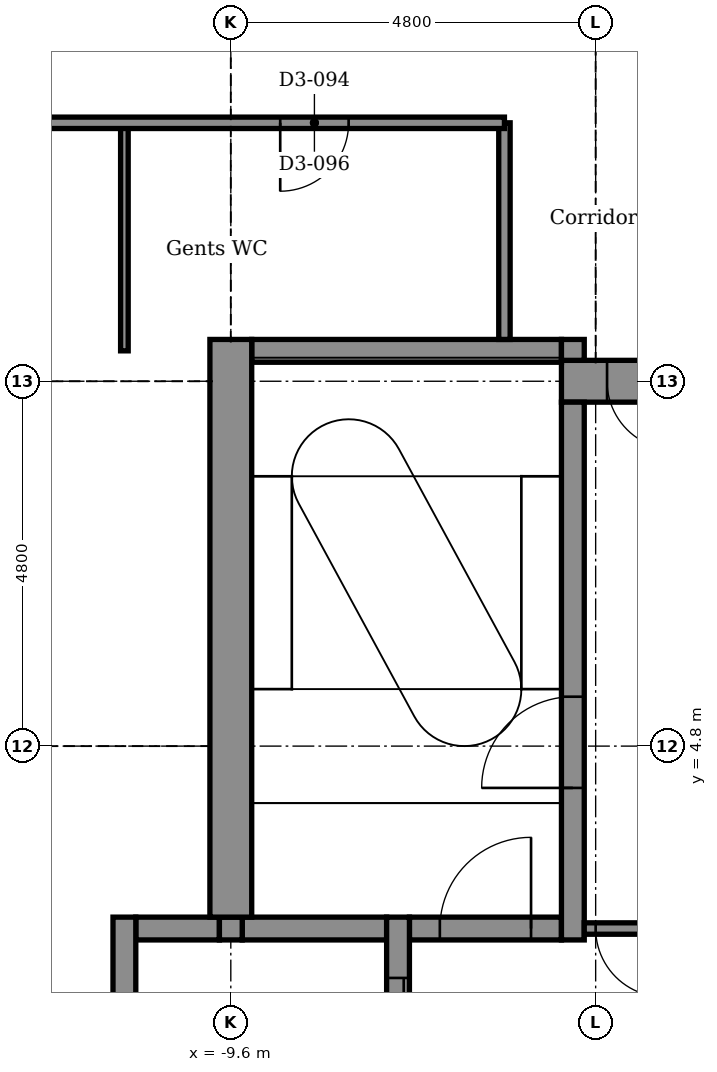
"""IFC4 building model, lengths in metres.
Left out: names, types, materials, properties, quantities, classifications, styles, units other than length and angle.
Written with IfcOpenShell. Run it as: python <this file> out.ifc"""

import sys

from ifc_helpers import new_model, si_unit, direction, frame, frame_2d, origin, place, context, subcontext, project, spatial, rectangle, extrude, element, fill, save


model = new_model("IFC4")
c1 = context("Model", 3, precision=1e-05, world=origin(), true_north=direction((0.0, 1.0)))
c2 = subcontext(c1, "Body", "Model", "MODEL_VIEW")
j1 = project(units=[si_unit("LENGTHUNIT", "METRE"), si_unit("PLANEANGLEUNIT", "RADIAN")], contexts=[c1])
p1 = place(None, origin())
s1 = spatial("IfcSite", under=j1, at=p1, CompositionType="ELEMENT")
p2 = place(p1, origin())
s2 = spatial("IfcBuilding", under=s1, at=p2, CompositionType="ELEMENT")
p3 = place(p2, frame((0.0, 0.0, 289.1)))
s3 = spatial("IfcBuildingStorey", under=s2, at=p3, CompositionType="ELEMENT", Elevation=289.1)
p4 = place(p3, frame((-10.85, 2.4, -0.15), z_axis=(0.0, 0.0, 1.0), x_axis=(1.0, 0.0, 0.0)))
e1 = element("IfcWall", 1, at=p4, inside=s3, PredefinedType="STANDARD", context=c2, shape_type="SweptSolid", body=[
    extrude(rectangle(XDim=1.1, YDim=0.3, at=frame_2d((0.55, 0.0))), origin(), (0.0, 0.0, 1.0), 3.9),
])
p5 = place(p3, frame((-9.45, 2.4, -0.15), z_axis=(0.0, 0.0, 1.0), x_axis=(1.0, 0.0, 0.0)))
e2 = element("IfcWall", 2, at=p5, inside=s3, PredefinedType="STANDARD", context=c2, shape_type="SweptSolid", body=[
    extrude(rectangle(XDim=1.9, YDim=0.3, at=frame_2d((0.95, 0.0))), origin(), (0.0, 0.0, 1.0), 3.9),
])
p6 = place(p3, frame((-7.25, 2.4, -0.15), z_axis=(0.0, 0.0, 1.0), x_axis=(1.0, 0.0, 0.0)))
e3 = element("IfcWall", 3, at=p6, inside=s3, PredefinedType="STANDARD", context=c2, shape_type="SweptSolid", body=[
    extrude(rectangle(XDim=2.0, YDim=0.3, at=frame_2d((1.0, 0.0))), origin(), (0.0, 0.0, 1.0), 3.9),
])
p7 = place(p6, frame((0.4, 0.0, 0.15)))
e4 = element("IfcOpeningElement", 4, at=p7, cuts=e3, PredefinedType="OPENING", context=c2, shape_type="SweptSolid", body=[
    extrude(rectangle(XDim=1.2, YDim=2.1, at=frame_2d((0.6, 1.05))), frame((0.0, 0.16, 0.0), z_axis=(0.0, -1.0, 0.0), x_axis=(1.0, 0.0, 0.0)), (0.0, 0.0, 1.0), 0.32),
])
p8 = place(p3, frame((-5.25, 9.6, -0.15), z_axis=(0.0, 0.0, 1.0), x_axis=(1.0, 0.0, 0.0)))
e5 = element("IfcWall", 5, at=p8, inside=s3, PredefinedType="SHEAR", context=c2, shape_type="SweptSolid", body=[
    extrude(rectangle(XDim=14.575, YDim=0.55, at=frame_2d((7.288, 0.0))), origin(), (0.0, 0.0, 1.0), 3.9),
])
p9 = place(p8, frame((0.6, 0.0, 0.15)))
e6 = element("IfcOpeningElement", 6, at=p9, cuts=e5, PredefinedType="OPENING", context=c2, shape_type="SweptSolid", body=[
    extrude(rectangle(XDim=0.9, YDim=2.1, at=frame_2d((0.45, 1.05))), frame((0.0, 0.285, 0.0), z_axis=(0.0, -1.0, 0.0), x_axis=(1.0, 0.0, 0.0)), (0.0, 0.0, 1.0), 0.57),
])
p10 = place(p3, frame((-9.325, 10.0, -0.15), z_axis=(0.0, 0.0, 1.0), x_axis=(1.0, 0.0, 0.0)))
e7 = element("IfcWall", 7, at=p10, inside=s3, PredefinedType="STANDARD", context=c2, shape_type="SweptSolid", body=[
    extrude(rectangle(XDim=4.075, YDim=0.3, at=frame_2d((2.038, 0.0))), origin(), (0.0, 0.0, 1.0), 3.9),
])
p11 = place(p3, frame((-11.0, -2.55, -0.15), z_axis=(0.0, 0.0, 1.0), x_axis=(0.0, 1.0, 0.0)))
e8 = element("IfcWall", 8, at=p11, inside=s3, PredefinedType="STANDARD", context=c2, shape_type="SweptSolid", body=[
    extrude(rectangle(XDim=5.1, YDim=0.3, at=frame_2d((2.55, 0.0))), origin(), (0.0, 0.0, 1.0), 3.9),
])
p12 = place(p3, frame((-9.6, 2.25, -0.15), z_axis=(0.0, 0.0, 1.0), x_axis=(0.0, 1.0, 0.0)))
e9 = element("IfcWall", 9, at=p12, inside=s3, PredefinedType="STANDARD", context=c2, shape_type="SweptSolid", body=[
    extrude(rectangle(XDim=0.3, YDim=0.3, at=frame_2d((0.15, 0.0))), origin(), (0.0, 0.0, 1.0), 3.9),
])
p13 = place(p3, frame((-9.6, 2.55, -0.15), z_axis=(0.0, 0.0, 1.0), x_axis=(0.0, 1.0, 0.0)))
e10 = element("IfcWall", 10, at=p13, inside=s3, PredefinedType="SHEAR", context=c2, shape_type="SweptSolid", body=[
    extrude(rectangle(XDim=7.6, YDim=0.55, at=frame_2d((3.8, 0.0))), origin(), (0.0, 0.0, 1.0), 3.9),
])
p14 = place(p3, frame((-7.4, -2.55, -0.15), z_axis=(0.0, 0.0, 1.0), x_axis=(0.0, 1.0, 0.0)))
e11 = element("IfcWall", 11, at=p14, inside=s3, PredefinedType="STANDARD", context=c2, shape_type="SweptSolid", body=[
    extrude(rectangle(XDim=5.1, YDim=0.3, at=frame_2d((2.55, 0.0))), origin(), (0.0, 0.0, 1.0), 3.9),
])
p15 = place(p14, frame((0.8, 0.0, 0.15)))
e12 = element("IfcOpeningElement", 12, at=p15, cuts=e11, PredefinedType="OPENING", context=c2, shape_type="SweptSolid", body=[
    extrude(rectangle(XDim=1.1, YDim=2.1, at=frame_2d((0.55, 1.05))), frame((0.0, 0.16, 0.0), z_axis=(0.0, -1.0, 0.0), x_axis=(1.0, 0.0, 0.0)), (0.0, 0.0, 1.0), 0.32),
])
p16 = place(p14, frame((3.2, 0.0, 0.15)))
e13 = element("IfcOpeningElement", 13, at=p16, cuts=e11, PredefinedType="OPENING", context=c2, shape_type="SweptSolid", body=[
    extrude(rectangle(XDim=1.1, YDim=2.1, at=frame_2d((0.55, 1.05))), frame((0.0, 0.16, 0.0), z_axis=(0.0, -1.0, 0.0), x_axis=(1.0, 0.0, 0.0)), (0.0, 0.0, 1.0), 0.32),
])
p17 = place(p3, frame((-5.1, 2.25, -0.15), z_axis=(0.0, 0.0, 1.0), x_axis=(0.0, 1.0, 0.0)))
e14 = element("IfcWall", 14, at=p17, inside=s3, PredefinedType="STANDARD", context=c2, shape_type="SweptSolid", body=[
    extrude(rectangle(XDim=7.075, YDim=0.3, at=frame_2d((3.538, 0.0))), origin(), (0.0, 0.0, 1.0), 3.9),
])
p18 = place(p17, frame((2.0, 0.0, 0.15)))
e15 = element("IfcOpeningElement", 15, at=p18, cuts=e14, PredefinedType="OPENING", context=c2, shape_type="SweptSolid", body=[
    extrude(rectangle(XDim=1.2, YDim=2.1, at=frame_2d((0.6, 1.05))), frame((0.0, 0.16, 0.0), z_axis=(0.0, -1.0, 0.0), x_axis=(1.0, 0.0, 0.0)), (0.0, 0.0, 1.0), 0.32),
])
p19 = place(p3, frame((-5.1, 9.875, -0.15), z_axis=(0.0, 0.0, 1.0), x_axis=(0.0, 1.0, 0.0)))
e16 = element("IfcWall", 16, at=p19, inside=s3, PredefinedType="STANDARD", context=c2, shape_type="SweptSolid", body=[
    extrude(rectangle(XDim=0.275, YDim=0.3, at=frame_2d((0.137, 0.0))), origin(), (0.0, 0.0, 1.0), 3.9),
])
p20 = place(p3, frame((-6.0, 10.15, 0.0), z_axis=(0.0, 0.0, 1.0), x_axis=(0.0, 1.0, 0.0)))
e17 = element("IfcWall", 17, at=p20, inside=s3, PredefinedType="PARTITIONING", context=c2, shape_type="SweptSolid", body=[
    extrude(rectangle(XDim=2.85, YDim=0.15, at=frame_2d((1.425, 0.0))), origin(), (0.0, 0.0, 1.0), 3.75),
])
p21 = place(p3, frame((-11.0, 10.0, 0.0), z_axis=(0.0, 0.0, 1.0), x_axis=(0.0, 1.0, 0.0)))
e18 = element("IfcWall", 18, at=p21, inside=s3, PredefinedType="PARTITIONING", context=c2, shape_type="SweptSolid", body=[
    extrude(rectangle(XDim=3.0, YDim=0.1, at=frame_2d((1.5, 0.0))), origin(), (0.0, 0.0, 1.0), 3.75),
])
p22 = place(p3, frame((-14.624, 13.0, 0.0), z_axis=(0.0, 0.0, 1.0), x_axis=(1.0, 0.0, 0.0)))
e19 = element("IfcWall", 19, at=p22, inside=s3, PredefinedType="PARTITIONING", context=c2, shape_type="SweptSolid", body=[
    extrude(rectangle(XDim=8.624, YDim=0.15, at=frame_2d((4.312, 0.0))), origin(), (0.0, 0.0, 1.0), 3.75),
])
p23 = place(p22, frame((5.674, 0.0, 0.0)))
e20 = element("IfcOpeningElement", 20, at=p23, cuts=e19, PredefinedType="OPENING", context=c2, shape_type="SweptSolid", body=[
    extrude(rectangle(XDim=0.9, YDim=2.1, at=frame_2d((0.45, 1.05))), frame((0.0, 0.085, 0.0), z_axis=(0.0, -1.0, 0.0), x_axis=(1.0, 0.0, 0.0)), (0.0, 0.0, 1.0), 0.17),
])
p24 = place(p22, frame((0.502, 0.0, 0.0)))
e21 = element("IfcOpeningElement", 21, at=p24, cuts=e19, PredefinedType="OPENING", context=c2, shape_type="SweptSolid", body=[
    extrude(rectangle(XDim=1.8, YDim=2.1, at=frame_2d((0.9, 1.05))), frame((0.0, 0.085, 0.0), z_axis=(0.0, -1.0, 0.0), x_axis=(1.0, 0.0, 0.0)), (0.0, 0.0, 1.0), 0.17),
])
p25 = place(p3, frame((-4.95, 2.4, 0.0), z_axis=(0.0, 0.0, 1.0), x_axis=(1.0, 0.0, 0.0)))
e22 = element("IfcWall", 22, at=p25, inside=s3, PredefinedType="PARTITIONING", context=c2, shape_type="SweptSolid", body=[
    extrude(rectangle(XDim=1.2, YDim=0.15, at=frame_2d((0.6, 0.0))), origin(), (0.0, 0.0, 1.0), 3.75),
])
p26 = place(p25, frame((0.15, 0.0, 0.0)))
e23 = element("IfcOpeningElement", 23, at=p26, cuts=e22, PredefinedType="OPENING", context=c2, shape_type="SweptSolid", body=[
    extrude(rectangle(XDim=0.9, YDim=2.1, at=frame_2d((0.45, 1.05))), frame((0.0, 0.085, 0.0), z_axis=(0.0, -1.0, 0.0), x_axis=(1.0, 0.0, 0.0)), (0.0, 0.0, 1.0), 0.17),
])
p27 = place(p23, frame((0.9, 0.0, 0.0), z_axis=(0.0, 0.0, 1.0), x_axis=(-1.0, 0.0, 0.0)))
e24 = element("IfcDoor", 24, at=p27, inside=s3, OperationType="SINGLE_SWING_LEFT", PredefinedType="DOOR", context=c2, shape_type="SweptSolid", body=[
    extrude(rectangle(XDim=0.9, YDim=2.1, at=frame_2d((0.45, 1.05))), frame((0.0, 0.025, 0.0), z_axis=(0.0, -1.0, 0.0), x_axis=(1.0, 0.0, 0.0)), (0.0, 0.0, 1.0), 0.05),
])
fill(e20, e24)
p28 = place(p16, origin())
e25 = element("IfcDoor", 25, at=p28, inside=s3, OperationType="DOUBLE_DOOR_SLIDING", PredefinedType="DOOR", context=c2, shape_type="SweptSolid", body=[
    extrude(rectangle(XDim=1.1, YDim=2.1, at=frame_2d((0.55, 1.05))), frame((0.0, 0.025, 0.0), z_axis=(0.0, -1.0, 0.0), x_axis=(1.0, 0.0, 0.0)), (0.0, 0.0, 1.0), 0.05),
])
fill(e13, e25)
p29 = place(p18, origin())
e26 = element("IfcDoor", 26, at=p29, inside=s3, OperationType="SINGLE_SWING_LEFT", PredefinedType="DOOR", context=c2, shape_type="SweptSolid", body=[
    extrude(rectangle(XDim=1.2, YDim=2.1, at=frame_2d((0.6, 1.05))), frame((0.0, 0.025, 0.0), z_axis=(0.0, -1.0, 0.0), x_axis=(1.0, 0.0, 0.0)), (0.0, 0.0, 1.0), 0.05),
])
fill(e15, e26)
p30 = place(p9, frame((0.9, 0.0, 0.0), z_axis=(0.0, 0.0, 1.0), x_axis=(-1.0, 0.0, 0.0)))
e27 = element("IfcDoor", 27, at=p30, inside=s3, OperationType="SINGLE_SWING_RIGHT", PredefinedType="DOOR", context=c2, shape_type="SweptSolid", body=[
    extrude(rectangle(XDim=0.9, YDim=2.1, at=frame_2d((0.45, 1.05))), frame((0.0, 0.025, 0.0), z_axis=(0.0, -1.0, 0.0), x_axis=(1.0, 0.0, 0.0)), (0.0, 0.0, 1.0), 0.05),
])
fill(e6, e27)
p31 = place(p26, frame((0.9, 0.0, 0.0), z_axis=(0.0, 0.0, 1.0), x_axis=(-1.0, 0.0, 0.0)))
e28 = element("IfcDoor", 28, at=p31, inside=s3, OperationType="SINGLE_SWING_RIGHT", PredefinedType="DOOR", context=c2, shape_type="SweptSolid", body=[
    extrude(rectangle(XDim=0.9, YDim=2.1, at=frame_2d((0.45, 1.05))), frame((0.0, 0.025, 0.0), z_axis=(0.0, -1.0, 0.0), x_axis=(1.0, 0.0, 0.0)), (0.0, 0.0, 1.0), 0.05),
])
fill(e23, e28)
p32 = place(p7, origin())
e29 = element("IfcDoor", 29, at=p32, inside=s3, OperationType="SINGLE_SWING_RIGHT", PredefinedType="DOOR", context=c2, shape_type="SweptSolid", body=[
    extrude(rectangle(XDim=1.2, YDim=2.1, at=frame_2d((0.6, 1.05))), frame((0.0, 0.025, 0.0), z_axis=(0.0, -1.0, 0.0), x_axis=(1.0, 0.0, 0.0)), (0.0, 0.0, 1.0), 0.05),
])
fill(e4, e29)
save(model, sys.argv[1])
